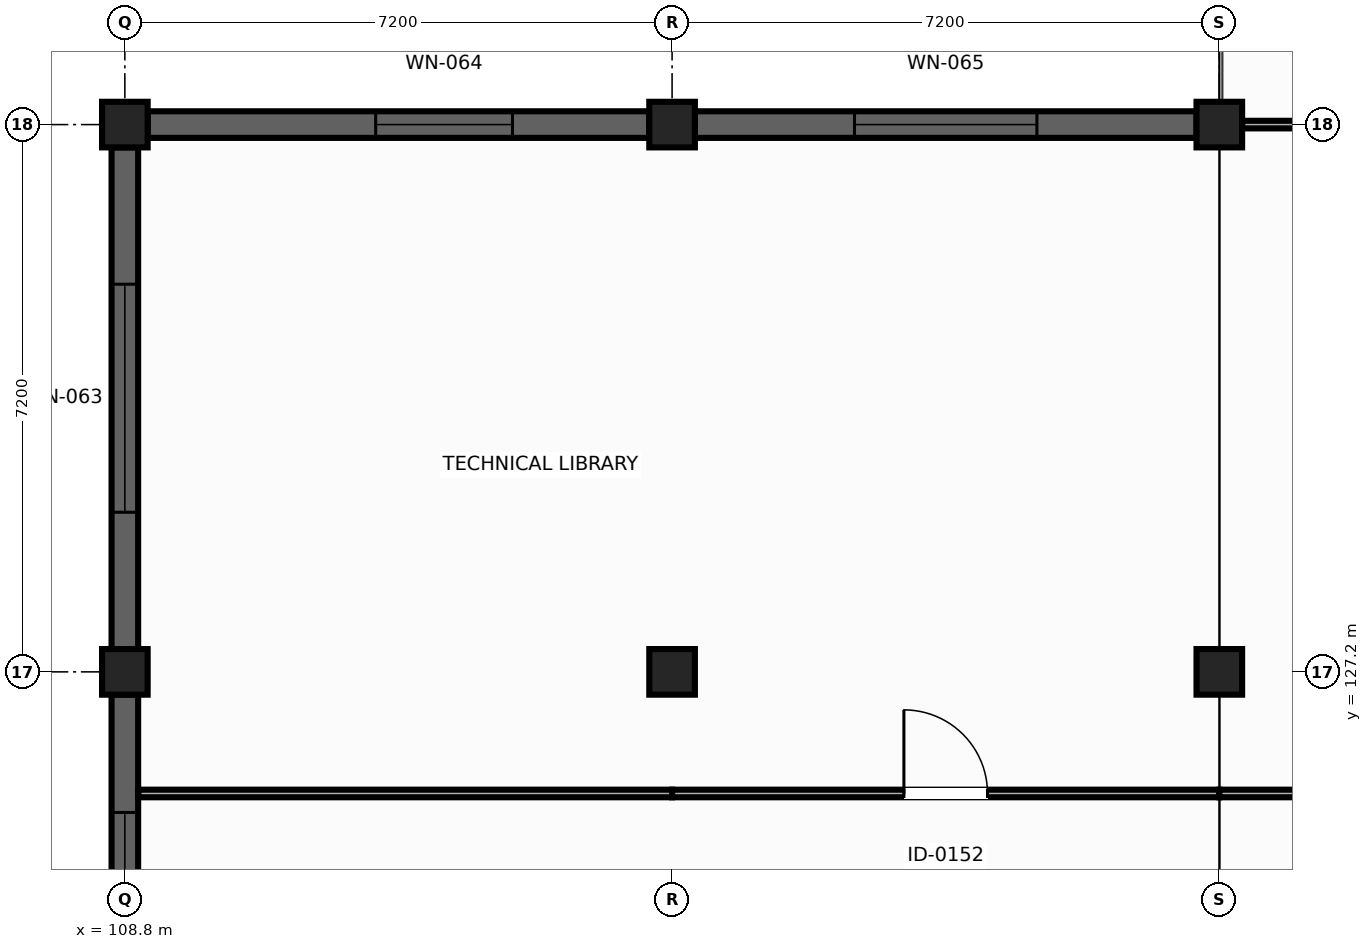
"""IFC4 building model, lengths in metres.
Left out: names, types, materials, properties, quantities, classifications, styles, units other than length and angle.
Written with IfcOpenShell. Run it as: python <this file> out.ifc"""

import sys

from ifc_helpers import new_model, si_unit, direction, frame, frame_2d, origin, origin_2d, place, context, subcontext, project, spatial, rectangle, extrude, element, fill, save


model = new_model("IFC4")
c1 = context("Model", 3, precision=1e-05, world=origin(), true_north=direction((0.0, 1.0)))
c2 = subcontext(c1, "Body", "Model", "MODEL_VIEW")
j1 = project(units=[si_unit("LENGTHUNIT", "METRE"), si_unit("PLANEANGLEUNIT", "RADIAN")], contexts=[c1])
p1 = place(None, origin())
s1 = spatial("IfcSite", under=j1, at=p1, CompositionType="ELEMENT")
p2 = place(p1, origin())
s2 = spatial("IfcBuilding", under=s1, at=p2, CompositionType="ELEMENT")
p3 = place(p2, frame((0.0, 0.0, 18.9)))
s3 = spatial("IfcBuildingStorey", under=s2, at=p3, CompositionType="ELEMENT", Elevation=18.9)
for number, where, z_axis, x_axis in (
    (1, (108.8, 127.2, 0.0), (0.0, 0.0, 1.0), (1.0, 0.0, 0.0)),
    (2, (116.0, 127.2, 0.0), (0.0, 0.0, 1.0), (0.0, 1.0, 0.0)),
    (3, (123.2, 127.2, 0.0), (0.0, 0.0, 1.0), (1.0, 0.0, 0.0)),
    (4, (108.8, 134.4, 0.0), (0.0, 0.0, 1.0), (0.0, 1.0, 0.0)),
    (5, (116.0, 134.4, 0.0), (0.0, 0.0, 1.0), (1.0, 0.0, 0.0)),
    (6, (123.2, 134.4, 0.0), (0.0, 0.0, 1.0), (0.0, 1.0, 0.0)),
):
    element("IfcColumn", number, at=place(p3, frame(where, z_axis=z_axis, x_axis=x_axis)), inside=s3, PredefinedType="COLUMN", context=c2, shape_type="SweptSolid", body=[
        extrude(rectangle(XDim=0.6, YDim=0.6, at=origin_2d()), origin(), (0.0, 0.0, 1.0), 4.2),
    ])
p4 = place(p3, frame((108.8, 120.3, 0.0), z_axis=(0.0, 0.0, 1.0), x_axis=(0.0, 1.0, 0.0)))
e7 = element("IfcWall", 7, at=p4, inside=s3, PredefinedType="SOLIDWALL", context=c2, shape_type="SweptSolid", body=[
    extrude(rectangle(XDim=6.6, YDim=0.35, at=frame_2d((3.3, 0.0))), origin(), (0.0, 0.0, 1.0), 3.95),
])
p5 = place(p4, frame((2.35, 0.0, 0.9)))
e8 = element("IfcOpeningElement", 8, at=p5, cuts=e7, PredefinedType="OPENING", context=c2, shape_type="SweptSolid", body=[
    extrude(rectangle(XDim=2.7, YDim=2.1, at=frame_2d((1.35, 1.05))), frame((0.0, 0.185, 0.0), z_axis=(0.0, -1.0, 0.0), x_axis=(1.0, 0.0, 0.0)), (0.0, 0.0, 1.0), 0.37),
])
p6 = place(p3, frame((108.8, 127.5, 0.0), z_axis=(0.0, 0.0, 1.0), x_axis=(0.0, 1.0, 0.0)))
e9 = element("IfcWall", 9, at=p6, inside=s3, PredefinedType="SOLIDWALL", context=c2, shape_type="SweptSolid", body=[
    extrude(rectangle(XDim=6.6, YDim=0.35, at=frame_2d((3.3, 0.0))), origin(), (0.0, 0.0, 1.0), 3.95),
])
p7 = place(p6, frame((1.8, 0.0, 0.9)))
e10 = element("IfcOpeningElement", 10, at=p7, cuts=e9, PredefinedType="OPENING", context=c2, shape_type="SweptSolid", body=[
    extrude(rectangle(XDim=3.0, YDim=2.1, at=frame_2d((1.5, 1.05))), frame((0.0, 0.185, 0.0), z_axis=(0.0, -1.0, 0.0), x_axis=(1.0, 0.0, 0.0)), (0.0, 0.0, 1.0), 0.37),
])
p8 = place(p3, frame((109.1, 134.4, 0.0), z_axis=(0.0, 0.0, 1.0), x_axis=(1.0, 0.0, 0.0)))
e11 = element("IfcWall", 11, at=p8, inside=s3, PredefinedType="SOLIDWALL", context=c2, shape_type="SweptSolid", body=[
    extrude(rectangle(XDim=6.6, YDim=0.35, at=frame_2d((3.3, 0.0))), origin(), (0.0, 0.0, 1.0), 3.95),
])
p9 = place(p8, frame((3.0, 0.0, 1.8)))
e12 = element("IfcOpeningElement", 12, at=p9, cuts=e11, PredefinedType="OPENING", context=c2, shape_type="SweptSolid", body=[
    extrude(rectangle(XDim=1.8, YDim=1.2, at=frame_2d((0.9, 0.6))), frame((0.0, 0.185, 0.0), z_axis=(0.0, -1.0, 0.0), x_axis=(1.0, 0.0, 0.0)), (0.0, 0.0, 1.0), 0.37),
])
p10 = place(p3, frame((116.3, 134.4, 0.0), z_axis=(0.0, 0.0, 1.0), x_axis=(1.0, 0.0, 0.0)))
e13 = element("IfcWall", 13, at=p10, inside=s3, PredefinedType="SOLIDWALL", context=c2, shape_type="SweptSolid", body=[
    extrude(rectangle(XDim=6.6, YDim=0.35, at=frame_2d((3.3, 0.0))), origin(), (0.0, 0.0, 1.0), 3.95),
])
p11 = place(p10, frame((2.1, 0.0, 1.8)))
e14 = element("IfcOpeningElement", 14, at=p11, cuts=e13, PredefinedType="OPENING", context=c2, shape_type="SweptSolid", body=[
    extrude(rectangle(XDim=2.4, YDim=1.2, at=frame_2d((1.2, 0.6))), frame((0.0, 0.185, 0.0), z_axis=(0.0, -1.0, 0.0), x_axis=(1.0, 0.0, 0.0)), (0.0, 0.0, 1.0), 0.37),
])
p12 = place(p3, frame((130.1, 134.4, 0.0), z_axis=(0.0, 0.0, 1.0), x_axis=(-1.0, 0.0, 0.0)))
e15 = element("IfcWall", 15, at=p12, inside=s3, PredefinedType="PARTITIONING", context=c2, shape_type="SweptSolid", body=[
    extrude(rectangle(XDim=6.6, YDim=0.1, at=frame_2d((3.3, 0.0))), origin(), (0.0, 0.0, 1.0), 3.445),
])
p13 = place(p3, frame((108.977, 125.6, 0.0), z_axis=(0.0, 0.0, 1.0), x_axis=(1.0, 0.0, 0.0)))
e16 = element("IfcWall", 16, at=p13, inside=s3, PredefinedType="PARTITIONING", context=c2, shape_type="SweptSolid", body=[
    extrude(rectangle(XDim=7.023, YDim=0.1, at=frame_2d((3.511, 0.0))), origin(), (0.0, 0.0, 1.0), 3.245),
])
p14 = place(p3, frame((116.0, 125.6, 0.0), z_axis=(0.0, 0.0, 1.0), x_axis=(1.0, 0.0, 0.0)))
e17 = element("IfcWall", 17, at=p14, inside=s3, PredefinedType="PARTITIONING", context=c2, shape_type="SweptSolid", body=[
    extrude(rectangle(XDim=7.2, YDim=0.1, at=frame_2d((3.6, 0.0))), origin(), (0.0, 0.0, 1.0), 3.245),
])
p15 = place(p14, frame((3.05, 0.0, 0.0)))
e18 = element("IfcOpeningElement", 18, at=p15, cuts=e17, PredefinedType="OPENING", context=c2, shape_type="SweptSolid", body=[
    extrude(rectangle(XDim=1.1, YDim=2.15, at=frame_2d((0.55, 1.075))), frame((0.0, 0.06, 0.0), z_axis=(0.0, -1.0, 0.0), x_axis=(1.0, 0.0, 0.0)), (0.0, 0.0, 1.0), 0.12),
])
p16 = place(p3, frame((123.2, 125.6, 0.0), z_axis=(0.0, 0.0, 1.0), x_axis=(1.0, 0.0, 0.0)))
e19 = element("IfcWall", 19, at=p16, inside=s3, PredefinedType="PARTITIONING", context=c2, shape_type="SweptSolid", body=[
    extrude(rectangle(XDim=7.148, YDim=0.1, at=frame_2d((3.574, 0.0))), origin(), (0.0, 0.0, 1.0), 3.245),
])
p17 = place(p5, origin())
e20 = element("IfcWindow", 20, at=p17, inside=s3, PartitioningType="SINGLE_PANEL", PredefinedType="WINDOW", context=c2, shape_type="SweptSolid", body=[
    extrude(rectangle(XDim=2.7, YDim=2.1, at=frame_2d((1.35, 1.05))), frame((0.0, 0.03, 0.0), z_axis=(0.0, -1.0, 0.0), x_axis=(1.0, 0.0, 0.0)), (0.0, 0.0, 1.0), 0.06),
])
fill(e8, e20)
p18 = place(p7, origin())
e21 = element("IfcWindow", 21, at=p18, inside=s3, PartitioningType="SINGLE_PANEL", PredefinedType="WINDOW", context=c2, shape_type="SweptSolid", body=[
    extrude(rectangle(XDim=3.0, YDim=2.1, at=frame_2d((1.5, 1.05))), frame((0.0, 0.03, 0.0), z_axis=(0.0, -1.0, 0.0), x_axis=(1.0, 0.0, 0.0)), (0.0, 0.0, 1.0), 0.06),
])
fill(e10, e21)
p19 = place(p9, origin())
e22 = element("IfcWindow", 22, at=p19, inside=s3, PartitioningType="SINGLE_PANEL", PredefinedType="WINDOW", context=c2, shape_type="SweptSolid", body=[
    extrude(rectangle(XDim=1.8, YDim=1.2, at=frame_2d((0.9, 0.6))), frame((0.0, 0.03, 0.0), z_axis=(0.0, -1.0, 0.0), x_axis=(1.0, 0.0, 0.0)), (0.0, 0.0, 1.0), 0.06),
])
fill(e12, e22)
p20 = place(p11, origin())
e23 = element("IfcWindow", 23, at=p20, inside=s3, PartitioningType="SINGLE_PANEL", PredefinedType="WINDOW", context=c2, shape_type="SweptSolid", body=[
    extrude(rectangle(XDim=2.4, YDim=1.2, at=frame_2d((1.2, 0.6))), frame((0.0, 0.03, 0.0), z_axis=(0.0, -1.0, 0.0), x_axis=(1.0, 0.0, 0.0)), (0.0, 0.0, 1.0), 0.06),
])
fill(e14, e23)
p21 = place(p15, origin())
e24 = element("IfcDoor", 24, at=p21, inside=s3, OperationType="SINGLE_SWING_LEFT", PredefinedType="DOOR", context=c2, shape_type="SweptSolid", body=[
    extrude(rectangle(XDim=1.1, YDim=2.15, at=frame_2d((0.55, 1.075))), frame((0.0, 0.025, 0.0), z_axis=(0.0, -1.0, 0.0), x_axis=(1.0, 0.0, 0.0)), (0.0, 0.0, 1.0), 0.05),
])
fill(e18, e24)
save(model, sys.argv[1])
